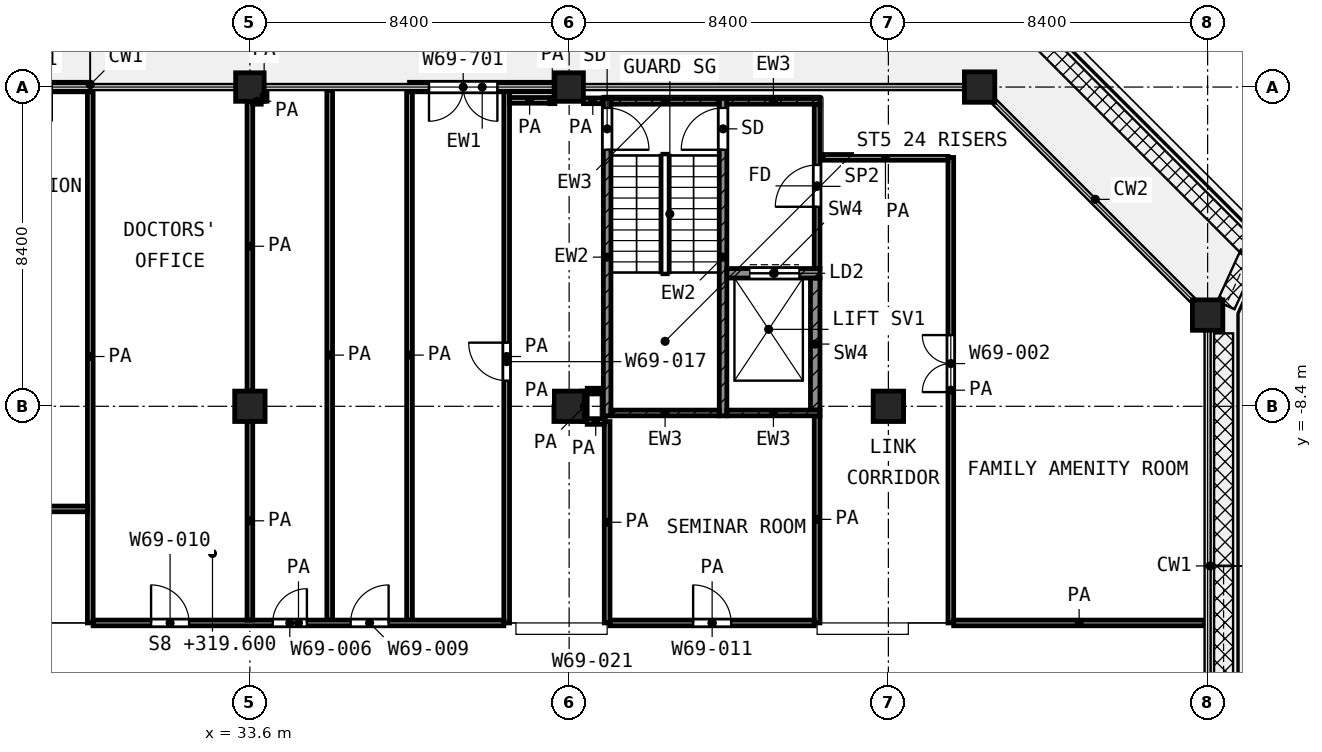
"""IFC4 building model, lengths in metres.
Left out: names, types, materials, properties, quantities, classifications, styles, units other than length and angle.
Written with IfcOpenShell. Run it as: python <this file> out.ifc"""

import sys

from ifc_helpers import new_model, si_unit, direction, frame, frame_2d, origin, origin_2d, place, context, subcontext, project, spatial, rectangle, extrude, element, fill, save


model = new_model("IFC4")
c1 = context("Model", 3, precision=1e-05, world=origin(), true_north=direction((0.0, 1.0)))
c2 = subcontext(c1, "Body", "Model", "MODEL_VIEW")
j1 = project(units=[si_unit("LENGTHUNIT", "METRE"), si_unit("PLANEANGLEUNIT", "RADIAN")], contexts=[c1])
p1 = place(None, origin())
s1 = spatial("IfcSite", under=j1, at=p1, CompositionType="ELEMENT")
p2 = place(p1, origin())
s2 = spatial("IfcBuilding", under=s1, at=p2, CompositionType="ELEMENT")
p3 = place(p2, frame((0.0, 0.0, 319.6)))
s3 = spatial("IfcBuildingStorey", under=s2, at=p3, CompositionType="ELEMENT", Elevation=319.6)
for number, where, z_axis, x_axis in (
    (1, (33.6, 0.0, 0.0), (0.0, 0.0, 1.0), (1.0, 0.0, 0.0)),
    (2, (42.0, 0.0, 0.0), (0.0, 0.0, 1.0), (1.0, 0.0, 0.0)),
):
    element("IfcColumn", number, at=place(p3, frame(where, z_axis=z_axis, x_axis=x_axis)), inside=s3, PredefinedType="COLUMN", context=c2, shape_type="SweptSolid", body=[
        extrude(rectangle(XDim=0.75, YDim=0.75, at=origin_2d()), origin(), (0.0, 0.0, 1.0), 4.2),
    ])
for number, where, z_axis, x_axis in (
    (3, (52.8, 0.0, 0.0), (0.0, 0.0, 1.0), (1.0, 0.0, 0.0)),
    (4, (58.8, -6.0, 0.0), (0.0, 0.0, 1.0), (1.0, 0.0, 0.0)),
    (5, (33.6, -8.4, 0.0), (0.0, 0.0, 1.0), (1.0, 0.0, 0.0)),
    (6, (42.0, -8.4, 0.0), (0.0, 0.0, 1.0), (1.0, 0.0, 0.0)),
    (7, (50.4, -8.4, 0.0), (0.0, 0.0, 1.0), (1.0, 0.0, 0.0)),
):
    element("IfcColumn", number, at=place(p3, frame(where, z_axis=z_axis, x_axis=x_axis)), inside=s3, PredefinedType="COLUMN", context=c2, shape_type="SweptSolid", body=[
        extrude(rectangle(XDim=0.8, YDim=0.8, at=origin_2d()), origin(), (0.0, 0.0, 1.0), 4.2),
    ])
p4 = place(p3, frame((41.625, 0.0, 0.0), z_axis=(0.0, 0.0, 1.0), x_axis=(-1.0, 0.0, 0.0)))
e8 = element("IfcWall", 8, at=p4, inside=s3, PredefinedType="SOLIDWALL", context=c2, shape_type="SweptSolid", body=[
    extrude(rectangle(XDim=3.825, YDim=0.25, at=frame_2d((1.913, 0.0))), origin(), (0.0, 0.0, 1.0), 3.48),
])
p5 = place(p4, frame((1.512, 0.0, 0.0)))
e9 = element("IfcOpeningElement", 9, at=p5, cuts=e8, PredefinedType="OPENING", context=c2, shape_type="SweptSolid", body=[
    extrude(rectangle(XDim=1.8, YDim=2.1, at=frame_2d((0.9, 1.05))), frame((0.0, 0.135, 0.0), z_axis=(0.0, -1.0, 0.0), x_axis=(1.0, 0.0, 0.0)), (0.0, 0.0, 1.0), 0.27),
])
p6 = place(p3, frame((29.4, 0.0, 0.0), z_axis=(0.0, 0.0, 1.0), x_axis=(-1.0, 0.0, 0.0)))
e10 = element("IfcWall", 10, at=p6, inside=s3, PredefinedType="SOLIDWALL", context=c2, shape_type="SweptSolid", body=[
    extrude(rectangle(XDim=3.825, YDim=0.25, at=frame_2d((1.913, 0.0))), origin(), (0.0, 0.0, 1.0), 3.48),
])
p7 = place(p6, frame((1.012, 0.0, 0.0)))
e11 = element("IfcOpeningElement", 11, at=p7, cuts=e10, PredefinedType="OPENING", context=c2, shape_type="SweptSolid", body=[
    extrude(rectangle(XDim=1.8, YDim=2.1, at=frame_2d((0.9, 1.05))), frame((0.0, 0.135, 0.0), z_axis=(0.0, -1.0, 0.0), x_axis=(1.0, 0.0, 0.0)), (0.0, 0.0, 1.0), 0.27),
])
p8 = place(p3, frame((43.0, -8.65, 0.0), z_axis=(0.0, 0.0, 1.0), x_axis=(0.0, 1.0, 0.0)))
e12 = element("IfcWall", 12, at=p8, inside=s3, PredefinedType="SHEAR", context=c2, shape_type="SweptSolid", body=[
    extrude(rectangle(XDim=8.35, YDim=0.2, at=frame_2d((4.175, 0.0))), origin(), (0.0, 0.0, 1.0), 3.6),
])
p9 = place(p8, frame((7.0, 0.0, 0.0)))
e13 = element("IfcOpeningElement", 13, at=p9, cuts=e12, PredefinedType="OPENING", context=c2, shape_type="SweptSolid", body=[
    extrude(rectangle(XDim=1.1, YDim=2.1, at=frame_2d((0.55, 1.05))), frame((0.0, 0.11, 0.0), z_axis=(0.0, -1.0, 0.0), x_axis=(1.0, 0.0, 0.0)), (0.0, 0.0, 1.0), 0.22),
])
p10 = place(p3, frame((46.05, -8.65, 0.0), z_axis=(0.0, 0.0, 1.0), x_axis=(0.0, 1.0, 0.0)))
e14 = element("IfcWall", 14, at=p10, inside=s3, PredefinedType="SHEAR", context=c2, shape_type="SweptSolid", body=[
    extrude(rectangle(XDim=8.35, YDim=0.2, at=frame_2d((4.175, 0.0))), origin(), (0.0, 0.0, 1.0), 3.6),
])
p11 = place(p10, frame((7.0, 0.0, 0.0)))
e15 = element("IfcOpeningElement", 15, at=p11, cuts=e14, PredefinedType="OPENING", context=c2, shape_type="SweptSolid", body=[
    extrude(rectangle(XDim=1.1, YDim=2.1, at=frame_2d((0.55, 1.05))), frame((0.0, 0.11, 0.0), z_axis=(0.0, -1.0, 0.0), x_axis=(1.0, 0.0, 0.0)), (0.0, 0.0, 1.0), 0.22),
])
p12 = place(p3, frame((43.1, -0.375, 0.0), z_axis=(0.0, 0.0, 1.0), x_axis=(1.0, 0.0, 0.0)))
e16 = element("IfcWall", 16, at=p12, inside=s3, PredefinedType="SHEAR", context=c2, shape_type="SweptSolid", body=[
    extrude(rectangle(XDim=2.85, YDim=0.15, at=frame_2d((1.425, 0.0))), origin(), (0.0, 0.0, 1.0), 3.6),
])
p13 = place(p3, frame((46.15, -0.375, 0.0), z_axis=(0.0, 0.0, 1.0), x_axis=(1.0, 0.0, 0.0)))
e17 = element("IfcWall", 17, at=p13, inside=s3, PredefinedType="SHEAR", context=c2, shape_type="SweptSolid", body=[
    extrude(rectangle(XDim=2.45, YDim=0.15, at=frame_2d((1.225, 0.0))), origin(), (0.0, 0.0, 1.0), 3.6),
])
p14 = place(p3, frame((43.1, -8.575, 0.0), z_axis=(0.0, 0.0, 1.0), x_axis=(1.0, 0.0, 0.0)))
e18 = element("IfcWall", 18, at=p14, inside=s3, PredefinedType="SHEAR", context=c2, shape_type="SweptSolid", body=[
    extrude(rectangle(XDim=2.85, YDim=0.15, at=frame_2d((1.425, 0.0))), origin(), (0.0, 0.0, 1.0), 3.6),
])
p15 = place(p3, frame((46.15, -8.575, 0.0), z_axis=(0.0, 0.0, 1.0), x_axis=(1.0, 0.0, 0.0)))
e19 = element("IfcWall", 19, at=p15, inside=s3, PredefinedType="SHEAR", context=c2, shape_type="SweptSolid", body=[
    extrude(rectangle(XDim=2.45, YDim=0.15, at=frame_2d((1.225, 0.0))), origin(), (0.0, 0.0, 1.0), 3.6),
])
p16 = place(p3, frame((46.15, -4.9, 0.0), z_axis=(0.0, 0.0, 1.0), x_axis=(1.0, 0.0, 0.0)))
e20 = element("IfcWall", 20, at=p16, inside=s3, PredefinedType="SHEAR", context=c2, shape_type="SweptSolid", body=[
    extrude(rectangle(XDim=2.45, YDim=0.25, at=frame_2d((1.225, 0.0))), origin(), (0.0, 0.0, 1.0), 3.6),
])
p17 = place(p16, frame((0.6, 0.0, 0.0)))
e21 = element("IfcOpeningElement", 21, at=p17, cuts=e20, PredefinedType="OPENING", context=c2, shape_type="SweptSolid", body=[
    extrude(rectangle(XDim=1.3, YDim=2.1, at=frame_2d((0.65, 1.05))), frame((0.0, 0.135, 0.0), z_axis=(0.0, -1.0, 0.0), x_axis=(1.0, 0.0, 0.0)), (0.0, 0.0, 1.0), 0.27),
])
p18 = place(p3, frame((48.475, -8.5, 0.0), z_axis=(0.0, 0.0, 1.0), x_axis=(0.0, 1.0, 0.0)))
e22 = element("IfcWall", 22, at=p18, inside=s3, PredefinedType="SHEAR", context=c2, shape_type="SweptSolid", body=[
    extrude(rectangle(XDim=3.475, YDim=0.25, at=frame_2d((1.738, 0.0))), origin(), (0.0, 0.0, 1.0), 3.6),
])
p19 = place(p3, frame((48.525, -4.775, 0.0), z_axis=(0.0, 0.0, 1.0), x_axis=(0.0, 1.0, 0.0)))
e23 = element("IfcWall", 23, at=p19, inside=s3, PredefinedType="PARTITIONING", context=c2, shape_type="SweptSolid", body=[
    extrude(rectangle(XDim=4.325, YDim=0.15, at=frame_2d((2.163, 0.0))), origin(), (0.0, 0.0, 1.0), 3.6),
])
p20 = place(p19, frame((1.625, 0.0, 0.0)))
e24 = element("IfcOpeningElement", 24, at=p20, cuts=e23, PredefinedType="OPENING", context=c2, shape_type="SweptSolid", body=[
    extrude(rectangle(XDim=1.1, YDim=2.1, at=frame_2d((0.55, 1.05))), frame((0.0, 0.085, 0.0), z_axis=(0.0, -1.0, 0.0), x_axis=(1.0, 0.0, 0.0)), (0.0, 0.0, 1.0), 0.17),
])
p21 = place(p3, frame((29.475, -14.1, 0.0), z_axis=(0.0, 0.0, 1.0), x_axis=(1.0, 0.0, 0.0)))
e25 = element("IfcWall", 25, at=p21, inside=s3, PredefinedType="PARTITIONING", context=c2, shape_type="SweptSolid", body=[
    extrude(rectangle(XDim=10.807, YDim=0.15, at=frame_2d((5.403, 0.0))), origin(), (0.0, 0.0, 1.0), 3.6),
])
p22 = place(p21, frame((1.525, 0.0, 0.0)))
e26 = element("IfcOpeningElement", 26, at=p22, cuts=e25, PredefinedType="OPENING", context=c2, shape_type="SweptSolid", body=[
    extrude(rectangle(XDim=1.0, YDim=2.1, at=frame_2d((0.5, 1.05))), frame((0.0, 0.085, 0.0), z_axis=(0.0, -1.0, 0.0), x_axis=(1.0, 0.0, 0.0)), (0.0, 0.0, 1.0), 0.17),
])
p23 = place(p21, frame((4.725, 0.0, 0.0)))
e27 = element("IfcOpeningElement", 27, at=p23, cuts=e25, PredefinedType="OPENING", context=c2, shape_type="SweptSolid", body=[
    extrude(rectangle(XDim=0.9, YDim=2.1, at=frame_2d((0.45, 1.05))), frame((0.0, 0.085, 0.0), z_axis=(0.0, -1.0, 0.0), x_axis=(1.0, 0.0, 0.0)), (0.0, 0.0, 1.0), 0.17),
])
p24 = place(p21, frame((6.775, 0.0, 0.0)))
e28 = element("IfcOpeningElement", 28, at=p24, cuts=e25, PredefinedType="OPENING", context=c2, shape_type="SweptSolid", body=[
    extrude(rectangle(XDim=1.0, YDim=2.1, at=frame_2d((0.5, 1.05))), frame((0.0, 0.085, 0.0), z_axis=(0.0, -1.0, 0.0), x_axis=(1.0, 0.0, 0.0)), (0.0, 0.0, 1.0), 0.17),
])
p25 = place(p3, frame((43.075, -14.1, 0.0), z_axis=(0.0, 0.0, 1.0), x_axis=(1.0, 0.0, 0.0)))
e29 = element("IfcWall", 29, at=p25, inside=s3, PredefinedType="PARTITIONING", context=c2, shape_type="SweptSolid", body=[
    extrude(rectangle(XDim=5.375, YDim=0.15, at=frame_2d((2.688, 0.0))), origin(), (0.0, 0.0, 1.0), 3.6),
])
p26 = place(p25, frame((2.188, 0.0, 0.0)))
e30 = element("IfcOpeningElement", 30, at=p26, cuts=e29, PredefinedType="OPENING", context=c2, shape_type="SweptSolid", body=[
    extrude(rectangle(XDim=1.0, YDim=2.1, at=frame_2d((0.5, 1.05))), frame((0.0, 0.085, 0.0), z_axis=(0.0, -1.0, 0.0), x_axis=(1.0, 0.0, 0.0)), (0.0, 0.0, 1.0), 0.17),
])
p27 = place(p3, frame((52.118, -14.1, 0.0), z_axis=(0.0, 0.0, 1.0), x_axis=(1.0, 0.0, 0.0)))
e31 = element("IfcWall", 31, at=p27, inside=s3, PredefinedType="PARTITIONING", context=c2, shape_type="SweptSolid", body=[
    extrude(rectangle(XDim=6.602, YDim=0.15, at=frame_2d((3.301, 0.0))), origin(), (0.0, 0.0, 1.0), 3.6),
])
p28 = place(p3, frame((24.7, -11.1, 0.0), z_axis=(0.0, 0.0, 1.0), x_axis=(1.0, 0.0, 0.0)))
e32 = element("IfcWall", 32, at=p28, inside=s3, PredefinedType="PARTITIONING", context=c2, shape_type="SweptSolid", body=[
    extrude(rectangle(XDim=4.625, YDim=0.15, at=frame_2d((2.312, 0.0))), origin(), (0.0, 0.0, 1.0), 3.6),
])
p29 = place(p28, frame((2.0, 0.0, 0.0)))
e33 = element("IfcOpeningElement", 33, at=p29, cuts=e32, PredefinedType="OPENING", context=c2, shape_type="SweptSolid", body=[
    extrude(rectangle(XDim=1.2, YDim=2.1, at=frame_2d((0.6, 1.05))), frame((0.0, 0.085, 0.0), z_axis=(0.0, -1.0, 0.0), x_axis=(1.0, 0.0, 0.0)), (0.0, 0.0, 1.0), 0.17),
])
p30 = place(p3, frame((42.475, -8.8, 0.0), z_axis=(0.0, 0.0, 1.0), x_axis=(1.0, 0.0, 0.0)))
e34 = element("IfcWall", 34, at=p30, inside=s3, PredefinedType="PARTITIONING", context=c2, shape_type="SweptSolid", body=[
    extrude(rectangle(XDim=0.448, YDim=0.15, at=frame_2d((0.224, 0.0))), origin(), (0.0, 0.0, 1.0), 3.6),
])
p31 = place(p3, frame((42.476, -8.0, 0.0), z_axis=(0.0, 0.0, 1.0), x_axis=(1.0, 0.0, 0.0)))
e35 = element("IfcWall", 35, at=p31, inside=s3, PredefinedType="PARTITIONING", context=c2, shape_type="SweptSolid", body=[
    extrude(rectangle(XDim=0.344, YDim=0.15, at=frame_2d((0.172, 0.0))), origin(), (0.0, 0.0, 1.0), 3.6),
])
p32 = place(p3, frame((48.68, -1.85, 0.0), z_axis=(0.0, 0.0, 1.0), x_axis=(1.0, 0.0, 0.0)))
e36 = element("IfcWall", 36, at=p32, inside=s3, PredefinedType="PARTITIONING", context=c2, shape_type="SweptSolid", body=[
    extrude(rectangle(XDim=3.287, YDim=0.15, at=frame_2d((1.644, 0.0))), origin(), (0.0, 0.0, 1.0), 3.6),
])
p33 = place(p3, frame((33.677, -0.375, 0.0), z_axis=(0.0, 0.0, 1.0), x_axis=(1.0, 0.0, 0.0)))
e37 = element("IfcWall", 37, at=p33, inside=s3, PredefinedType="PARTITIONING", context=c2, shape_type="SweptSolid", body=[
    extrude(rectangle(XDim=0.221, YDim=0.15, at=frame_2d((0.11, 0.0))), origin(), (0.0, 0.0, 1.0), 3.6),
])
p34 = place(p3, frame((41.488, -0.362, 0.0), z_axis=(0.0, 0.0, 1.0), x_axis=(1.0, 0.0, 0.0)))
e38 = element("IfcWall", 38, at=p34, inside=s3, PredefinedType="PARTITIONING", context=c2, shape_type="SweptSolid", body=[
    extrude(rectangle(XDim=0.137, YDim=0.15, at=frame_2d((0.068, 0.0))), origin(), (0.0, 0.0, 1.0), 3.6),
])
p35 = place(p3, frame((42.375, -0.362, 0.0), z_axis=(0.0, 0.0, 1.0), x_axis=(1.0, 0.0, 0.0)))
e39 = element("IfcWall", 39, at=p35, inside=s3, PredefinedType="PARTITIONING", context=c2, shape_type="SweptSolid", body=[
    extrude(rectangle(XDim=0.495, YDim=0.15, at=frame_2d((0.248, 0.0))), origin(), (0.0, 0.0, 1.0), 3.6),
])
p36 = place(p3, frame((40.432, -0.35, 0.0), z_axis=(0.0, 0.0, 1.0), x_axis=(1.0, 0.0, 0.0)))
e40 = element("IfcWall", 40, at=p36, inside=s3, PredefinedType="PARTITIONING", context=c2, shape_type="SweptSolid", body=[
    extrude(rectangle(XDim=1.056, YDim=0.15, at=frame_2d((0.528, 0.0))), origin(), (0.0, 0.0, 1.0), 3.6),
])
p37 = place(p3, frame((29.4, -14.1, 0.0), z_axis=(0.0, 0.0, 1.0), x_axis=(0.0, 1.0, 0.0)))
e41 = element("IfcWall", 41, at=p37, inside=s3, PredefinedType="PARTITIONING", context=c2, shape_type="SweptSolid", body=[
    extrude(rectangle(XDim=14.02, YDim=0.15, at=frame_2d((7.01, 0.0))), origin(), (0.0, 0.0, 1.0), 3.6),
])
p38 = place(p3, frame((33.6, -14.025, 0.0), z_axis=(0.0, 0.0, 1.0), x_axis=(0.0, 1.0, 0.0)))
e42 = element("IfcWall", 42, at=p38, inside=s3, PredefinedType="PARTITIONING", context=c2, shape_type="SweptSolid", body=[
    extrude(rectangle(XDim=5.225, YDim=0.15, at=frame_2d((2.612, 0.0))), origin(), (0.0, 0.0, 1.0), 3.6),
])
p39 = place(p3, frame((33.6, -8.0, 0.0), z_axis=(0.0, 0.0, 1.0), x_axis=(0.0, 1.0, 0.0)))
e43 = element("IfcWall", 43, at=p39, inside=s3, PredefinedType="PARTITIONING", context=c2, shape_type="SweptSolid", body=[
    extrude(rectangle(XDim=7.623, YDim=0.15, at=frame_2d((3.812, 0.0))), origin(), (0.0, 0.0, 1.0), 3.6),
])
p40 = place(p3, frame((33.975, -0.373, 0.0), z_axis=(0.0, 0.0, 1.0), x_axis=(0.0, 1.0, 0.0)))
e44 = element("IfcWall", 44, at=p40, inside=s3, PredefinedType="PARTITIONING", context=c2, shape_type="SweptSolid", body=[
    extrude(rectangle(XDim=0.293, YDim=0.15, at=frame_2d((0.146, 0.0))), origin(), (0.0, 0.0, 1.0), 3.6),
])
for number, where, z_axis, x_axis in (
    (45, (35.7, -14.025, 0.0), (0.0, 0.0, 1.0), (0.0, 1.0, 0.0)),
    (46, (37.8, -14.025, 0.0), (0.0, 0.0, 1.0), (0.0, 1.0, 0.0)),
):
    element("IfcWall", number, at=place(p3, frame(where, z_axis=z_axis, x_axis=x_axis)), inside=s3, PredefinedType="PARTITIONING", context=c2, shape_type="SweptSolid", body=[
        extrude(rectangle(XDim=13.945, YDim=0.15, at=frame_2d((6.972, 0.0))), origin(), (0.0, 0.0, 1.0), 3.6),
    ])
p41 = place(p3, frame((40.357, -14.1, 0.0), z_axis=(0.0, 0.0, 1.0), x_axis=(0.0, 1.0, 0.0)))
e47 = element("IfcWall", 47, at=p41, inside=s3, PredefinedType="PARTITIONING", context=c2, shape_type="SweptSolid", body=[
    extrude(rectangle(XDim=14.02, YDim=0.15, at=frame_2d((7.01, 0.0))), origin(), (0.0, 0.0, 1.0), 3.6),
])
p42 = place(p41, frame((6.375, 0.0, 0.0)))
e48 = element("IfcOpeningElement", 48, at=p42, cuts=e47, PredefinedType="OPENING", context=c2, shape_type="SweptSolid", body=[
    extrude(rectangle(XDim=1.0, YDim=2.1, at=frame_2d((0.5, 1.05))), frame((0.0, 0.085, 0.0), z_axis=(0.0, -1.0, 0.0), x_axis=(1.0, 0.0, 0.0)), (0.0, 0.0, 1.0), 0.17),
])
p43 = place(p3, frame((42.4, -8.8, 0.0), z_axis=(0.0, 0.0, 1.0), x_axis=(0.0, 1.0, 0.0)))
e49 = element("IfcWall", 49, at=p43, inside=s3, PredefinedType="PARTITIONING", context=c2, shape_type="SweptSolid", body=[
    extrude(rectangle(XDim=0.799, YDim=0.15, at=frame_2d((0.399, 0.0))), origin(), (0.0, 0.0, 1.0), 3.6),
])
p44 = place(p3, frame((43.0, -14.1, 0.0), z_axis=(0.0, 0.0, 1.0), x_axis=(0.0, 1.0, 0.0)))
e50 = element("IfcWall", 50, at=p44, inside=s3, PredefinedType="PARTITIONING", context=c2, shape_type="SweptSolid", body=[
    extrude(rectangle(XDim=5.298, YDim=0.15, at=frame_2d((2.649, 0.0))), origin(), (0.0, 0.0, 1.0), 3.6),
])
p45 = place(p3, frame((48.525, -14.1, 0.0), z_axis=(0.0, 0.0, 1.0), x_axis=(0.0, 1.0, 0.0)))
e51 = element("IfcWall", 51, at=p45, inside=s3, PredefinedType="PARTITIONING", context=c2, shape_type="SweptSolid", body=[
    extrude(rectangle(XDim=5.45, YDim=0.15, at=frame_2d((2.725, 0.0))), origin(), (0.0, 0.0, 1.0), 3.6),
])
p46 = place(p3, frame((52.043, -14.1, 0.0), z_axis=(0.0, 0.0, 1.0), x_axis=(0.0, 1.0, 0.0)))
e52 = element("IfcWall", 52, at=p46, inside=s3, PredefinedType="PARTITIONING", context=c2, shape_type="SweptSolid", body=[
    extrude(rectangle(XDim=12.248, YDim=0.15, at=frame_2d((6.124, 0.0))), origin(), (0.0, 0.0, 1.0), 3.6),
])
p47 = place(p46, frame((6.074, 0.0, 0.0)))
e53 = element("IfcOpeningElement", 53, at=p47, cuts=e52, PredefinedType="OPENING", context=c2, shape_type="SweptSolid", body=[
    extrude(rectangle(XDim=1.5, YDim=2.1, at=frame_2d((0.75, 1.05))), frame((0.0, 0.085, 0.0), z_axis=(0.0, -1.0, 0.0), x_axis=(1.0, 0.0, 0.0)), (0.0, 0.0, 1.0), 0.17),
])
p48 = place(p5, origin())
e54 = element("IfcDoor", 54, at=p48, inside=s3, OperationType="DOUBLE_DOOR_SINGLE_SWING", PredefinedType="DOOR", context=c2, shape_type="SweptSolid", body=[
    extrude(rectangle(XDim=1.8, YDim=2.1, at=frame_2d((0.9, 1.05))), frame((0.0, 0.025, 0.0), z_axis=(0.0, -1.0, 0.0), x_axis=(1.0, 0.0, 0.0)), (0.0, 0.0, 1.0), 0.05),
])
fill(e9, e54)
p49 = place(p9, frame((1.1, 0.0, 0.0), z_axis=(0.0, 0.0, 1.0), x_axis=(-1.0, 0.0, 0.0)))
e55 = element("IfcDoor", 55, at=p49, inside=s3, OperationType="SINGLE_SWING_LEFT", PredefinedType="DOOR", context=c2, shape_type="SweptSolid", body=[
    extrude(rectangle(XDim=1.1, YDim=2.1, at=frame_2d((0.55, 1.05))), frame((0.0, 0.025, 0.0), z_axis=(0.0, -1.0, 0.0), x_axis=(1.0, 0.0, 0.0)), (0.0, 0.0, 1.0), 0.05),
])
fill(e13, e55)
p50 = place(p11, origin())
e56 = element("IfcDoor", 56, at=p50, inside=s3, OperationType="SINGLE_SWING_LEFT", PredefinedType="DOOR", context=c2, shape_type="SweptSolid", body=[
    extrude(rectangle(XDim=1.1, YDim=2.1, at=frame_2d((0.55, 1.05))), frame((0.0, 0.025, 0.0), z_axis=(0.0, -1.0, 0.0), x_axis=(1.0, 0.0, 0.0)), (0.0, 0.0, 1.0), 0.05),
])
fill(e15, e56)
p51 = place(p17, origin())
e57 = element("IfcDoor", 57, at=p51, inside=s3, OperationType="DOUBLE_DOOR_SLIDING", PredefinedType="DOOR", context=c2, shape_type="SweptSolid", body=[
    extrude(rectangle(XDim=1.3, YDim=2.1, at=frame_2d((0.65, 1.05))), frame((0.0, 0.025, 0.0), z_axis=(0.0, -1.0, 0.0), x_axis=(1.0, 0.0, 0.0)), (0.0, 0.0, 1.0), 0.05),
])
fill(e21, e57)
p52 = place(p20, origin())
e58 = element("IfcDoor", 58, at=p52, inside=s3, OperationType="SINGLE_SWING_LEFT", PredefinedType="DOOR", context=c2, shape_type="SweptSolid", body=[
    extrude(rectangle(XDim=1.1, YDim=2.1, at=frame_2d((0.55, 1.05))), frame((0.0, 0.025, 0.0), z_axis=(0.0, -1.0, 0.0), x_axis=(1.0, 0.0, 0.0)), (0.0, 0.0, 1.0), 0.05),
])
fill(e24, e58)
p53 = place(p22, origin())
e59 = element("IfcDoor", 59, at=p53, inside=s3, OperationType="SINGLE_SWING_LEFT", PredefinedType="DOOR", context=c2, shape_type="SweptSolid", body=[
    extrude(rectangle(XDim=1.0, YDim=2.1, at=frame_2d((0.5, 1.05))), frame((0.0, 0.025, 0.0), z_axis=(0.0, -1.0, 0.0), x_axis=(1.0, 0.0, 0.0)), (0.0, 0.0, 1.0), 0.05),
])
fill(e26, e59)
p54 = place(p26, origin())
e60 = element("IfcDoor", 60, at=p54, inside=s3, OperationType="SINGLE_SWING_LEFT", PredefinedType="DOOR", context=c2, shape_type="SweptSolid", body=[
    extrude(rectangle(XDim=1.0, YDim=2.1, at=frame_2d((0.5, 1.05))), frame((0.0, 0.025, 0.0), z_axis=(0.0, -1.0, 0.0), x_axis=(1.0, 0.0, 0.0)), (0.0, 0.0, 1.0), 0.05),
])
fill(e30, e60)
p55 = place(p47, origin())
e61 = element("IfcDoor", 61, at=p55, inside=s3, OperationType="DOUBLE_DOOR_SINGLE_SWING", PredefinedType="DOOR", context=c2, shape_type="SweptSolid", body=[
    extrude(rectangle(XDim=1.5, YDim=2.1, at=frame_2d((0.75, 1.05))), frame((0.0, 0.025, 0.0), z_axis=(0.0, -1.0, 0.0), x_axis=(1.0, 0.0, 0.0)), (0.0, 0.0, 1.0), 0.05),
])
fill(e53, e61)
p56 = place(p23, origin())
e62 = element("IfcDoor", 62, at=p56, inside=s3, OperationType="SINGLE_SWING_RIGHT", PredefinedType="DOOR", context=c2, shape_type="SweptSolid", body=[
    extrude(rectangle(XDim=0.9, YDim=2.1, at=frame_2d((0.45, 1.05))), frame((0.0, 0.025, 0.0), z_axis=(0.0, -1.0, 0.0), x_axis=(1.0, 0.0, 0.0)), (0.0, 0.0, 1.0), 0.05),
])
fill(e27, e62)
p57 = place(p24, origin())
e63 = element("IfcDoor", 63, at=p57, inside=s3, OperationType="SINGLE_SWING_RIGHT", PredefinedType="DOOR", context=c2, shape_type="SweptSolid", body=[
    extrude(rectangle(XDim=1.0, YDim=2.1, at=frame_2d((0.5, 1.05))), frame((0.0, 0.025, 0.0), z_axis=(0.0, -1.0, 0.0), x_axis=(1.0, 0.0, 0.0)), (0.0, 0.0, 1.0), 0.05),
])
fill(e28, e63)
p58 = place(p42, origin())
e64 = element("IfcDoor", 64, at=p58, inside=s3, OperationType="SINGLE_SWING_RIGHT", PredefinedType="DOOR", context=c2, shape_type="SweptSolid", body=[
    extrude(rectangle(XDim=1.0, YDim=2.1, at=frame_2d((0.5, 1.05))), frame((0.0, 0.025, 0.0), z_axis=(0.0, -1.0, 0.0), x_axis=(1.0, 0.0, 0.0)), (0.0, 0.0, 1.0), 0.05),
])
fill(e48, e64)
save(model, sys.argv[1])
